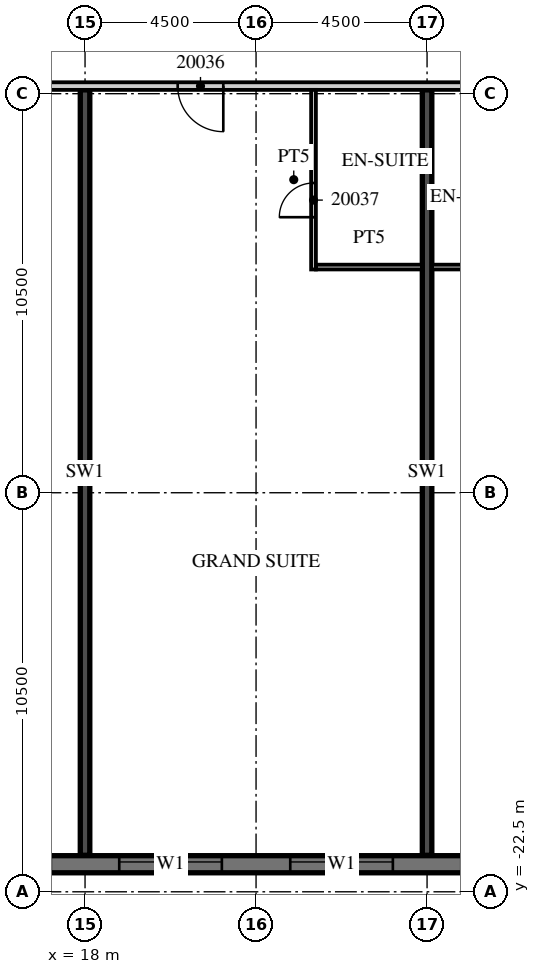
"""IFC4 building model, lengths in metres.
Left out: names, types, materials, properties, quantities, classifications, styles, units other than length and angle.
Written with IfcOpenShell. Run it as: python <this file> out.ifc"""

import sys

from ifc_helpers import new_model, si_unit, direction, frame, frame_2d, origin, place, context, subcontext, project, spatial, rectangle, extrude, element, fill, save


model = new_model("IFC4")
c1 = context("Model", 3, precision=1e-05, world=origin(), true_north=direction((0.0, 1.0)))
c2 = subcontext(c1, "Body", "Model", "MODEL_VIEW")
j1 = project(units=[si_unit("LENGTHUNIT", "METRE"), si_unit("PLANEANGLEUNIT", "RADIAN")], contexts=[c1])
p1 = place(None, origin())
s1 = spatial("IfcSite", under=j1, at=p1, CompositionType="ELEMENT")
p2 = place(p1, origin())
s2 = spatial("IfcBuilding", under=s1, at=p2, CompositionType="ELEMENT")
p3 = place(p2, frame((0.0, 0.0, 96.3)))
s3 = spatial("IfcBuildingStorey", under=s2, at=p3, CompositionType="ELEMENT", Elevation=96.3)
for number, where, z_axis, x_axis in (
    (1, (18.0, -21.54, 0.0), (0.0, 0.0, 1.0), (0.0, 1.0, 0.0)),
    (2, (27.0, -21.54, 0.0), (0.0, 0.0, 1.0), (0.0, 1.0, 0.0)),
):
    element("IfcWall", number, at=place(p3, frame(where, z_axis=z_axis, x_axis=x_axis)), inside=s3, PredefinedType="SHEAR", context=c2, shape_type="SweptSolid", body=[
        extrude(rectangle(XDim=20.14, YDim=0.25, at=frame_2d((10.07, 0.0))), origin(), (0.0, 0.0, 1.0), 3.0),
    ])
p4 = place(p3, frame((-13.5, -21.775, 0.0), z_axis=(0.0, 0.0, 1.0), x_axis=(1.0, 0.0, 0.0)))
e3 = element("IfcWall", 3, at=p4, inside=s3, PredefinedType="SOLIDWALL", context=c2, shape_type="SweptSolid", body=[
    extrude(rectangle(XDim=54.5, YDim=0.45, at=frame_2d((27.25, 0.0))), origin(), (0.0, 0.0, 1.0), 3.0),
])
p5 = place(p4, frame((0.9, 0.0, 0.45)))
e4 = element("IfcOpeningElement", 4, at=p5, cuts=e3, PredefinedType="OPENING", context=c2, shape_type="SweptSolid", body=[
    extrude(rectangle(XDim=2.7, YDim=2.25, at=frame_2d((1.35, 1.125))), frame((0.0, 0.235, 0.0), z_axis=(0.0, -1.0, 0.0), x_axis=(1.0, 0.0, 0.0)), (0.0, 0.0, 1.0), 0.47),
])
p6 = place(p4, frame((5.4, 0.0, 0.45)))
e5 = element("IfcOpeningElement", 5, at=p6, cuts=e3, PredefinedType="OPENING", context=c2, shape_type="SweptSolid", body=[
    extrude(rectangle(XDim=2.7, YDim=2.25, at=frame_2d((1.35, 1.125))), frame((0.0, 0.235, 0.0), z_axis=(0.0, -1.0, 0.0), x_axis=(1.0, 0.0, 0.0)), (0.0, 0.0, 1.0), 0.47),
])
p7 = place(p4, frame((9.9, 0.0, 0.45)))
e6 = element("IfcOpeningElement", 6, at=p7, cuts=e3, PredefinedType="OPENING", context=c2, shape_type="SweptSolid", body=[
    extrude(rectangle(XDim=2.7, YDim=2.25, at=frame_2d((1.35, 1.125))), frame((0.0, 0.235, 0.0), z_axis=(0.0, -1.0, 0.0), x_axis=(1.0, 0.0, 0.0)), (0.0, 0.0, 1.0), 0.47),
])
p8 = place(p4, frame((14.4, 0.0, 0.45)))
e7 = element("IfcOpeningElement", 7, at=p8, cuts=e3, PredefinedType="OPENING", context=c2, shape_type="SweptSolid", body=[
    extrude(rectangle(XDim=2.7, YDim=2.25, at=frame_2d((1.35, 1.125))), frame((0.0, 0.235, 0.0), z_axis=(0.0, -1.0, 0.0), x_axis=(1.0, 0.0, 0.0)), (0.0, 0.0, 1.0), 0.47),
])
p9 = place(p4, frame((18.9, 0.0, 0.45)))
e8 = element("IfcOpeningElement", 8, at=p9, cuts=e3, PredefinedType="OPENING", context=c2, shape_type="SweptSolid", body=[
    extrude(rectangle(XDim=2.7, YDim=2.25, at=frame_2d((1.35, 1.125))), frame((0.0, 0.235, 0.0), z_axis=(0.0, -1.0, 0.0), x_axis=(1.0, 0.0, 0.0)), (0.0, 0.0, 1.0), 0.47),
])
p10 = place(p4, frame((23.4, 0.0, 0.45)))
e9 = element("IfcOpeningElement", 9, at=p10, cuts=e3, PredefinedType="OPENING", context=c2, shape_type="SweptSolid", body=[
    extrude(rectangle(XDim=2.7, YDim=2.25, at=frame_2d((1.35, 1.125))), frame((0.0, 0.235, 0.0), z_axis=(0.0, -1.0, 0.0), x_axis=(1.0, 0.0, 0.0)), (0.0, 0.0, 1.0), 0.47),
])
p11 = place(p4, frame((27.9, 0.0, 0.45)))
e10 = element("IfcOpeningElement", 10, at=p11, cuts=e3, PredefinedType="OPENING", context=c2, shape_type="SweptSolid", body=[
    extrude(rectangle(XDim=2.7, YDim=2.25, at=frame_2d((1.35, 1.125))), frame((0.0, 0.235, 0.0), z_axis=(0.0, -1.0, 0.0), x_axis=(1.0, 0.0, 0.0)), (0.0, 0.0, 1.0), 0.47),
])
p12 = place(p4, frame((32.4, 0.0, 0.45)))
e11 = element("IfcOpeningElement", 11, at=p12, cuts=e3, PredefinedType="OPENING", context=c2, shape_type="SweptSolid", body=[
    extrude(rectangle(XDim=2.7, YDim=2.25, at=frame_2d((1.35, 1.125))), frame((0.0, 0.235, 0.0), z_axis=(0.0, -1.0, 0.0), x_axis=(1.0, 0.0, 0.0)), (0.0, 0.0, 1.0), 0.47),
])
p13 = place(p4, frame((36.9, 0.0, 0.45)))
e12 = element("IfcOpeningElement", 12, at=p13, cuts=e3, PredefinedType="OPENING", context=c2, shape_type="SweptSolid", body=[
    extrude(rectangle(XDim=2.7, YDim=2.25, at=frame_2d((1.35, 1.125))), frame((0.0, 0.235, 0.0), z_axis=(0.0, -1.0, 0.0), x_axis=(1.0, 0.0, 0.0)), (0.0, 0.0, 1.0), 0.47),
])
p14 = place(p4, frame((41.4, 0.0, 0.45)))
e13 = element("IfcOpeningElement", 13, at=p14, cuts=e3, PredefinedType="OPENING", context=c2, shape_type="SweptSolid", body=[
    extrude(rectangle(XDim=2.7, YDim=2.25, at=frame_2d((1.35, 1.125))), frame((0.0, 0.235, 0.0), z_axis=(0.0, -1.0, 0.0), x_axis=(1.0, 0.0, 0.0)), (0.0, 0.0, 1.0), 0.47),
])
p15 = place(p4, frame((45.9, 0.0, 0.45)))
e14 = element("IfcOpeningElement", 14, at=p15, cuts=e3, PredefinedType="OPENING", context=c2, shape_type="SweptSolid", body=[
    extrude(rectangle(XDim=2.7, YDim=2.25, at=frame_2d((1.35, 1.125))), frame((0.0, 0.235, 0.0), z_axis=(0.0, -1.0, 0.0), x_axis=(1.0, 0.0, 0.0)), (0.0, 0.0, 1.0), 0.47),
])
p16 = place(p4, frame((50.4, 0.0, 0.45)))
e15 = element("IfcOpeningElement", 15, at=p16, cuts=e3, PredefinedType="OPENING", context=c2, shape_type="SweptSolid", body=[
    extrude(rectangle(XDim=2.7, YDim=2.25, at=frame_2d((1.35, 1.125))), frame((0.0, 0.235, 0.0), z_axis=(0.0, -1.0, 0.0), x_axis=(1.0, 0.0, 0.0)), (0.0, 0.0, 1.0), 0.47),
])
p17 = place(p3, frame((-13.5, -1.3, 0.0), z_axis=(0.0, 0.0, 1.0), x_axis=(1.0, 0.0, 0.0)))
e16 = element("IfcWall", 16, at=p17, inside=s3, PredefinedType="PARTITIONING", context=c2, shape_type="SweptSolid", body=[
    extrude(rectangle(XDim=58.05, YDim=0.2, at=frame_2d((29.025, 0.0))), origin(), (0.0, 0.0, 1.0), 3.0),
])
p18 = place(p17, frame((0.575, 0.0, 0.0)))
e17 = element("IfcOpeningElement", 17, at=p18, cuts=e16, PredefinedType="OPENING", context=c2, shape_type="SweptSolid", body=[
    extrude(rectangle(XDim=1.0, YDim=2.1, at=frame_2d((0.5, 1.05))), frame((0.0, 0.11, 0.0), z_axis=(0.0, -1.0, 0.0), x_axis=(1.0, 0.0, 0.0)), (0.0, 0.0, 1.0), 0.22),
])
p19 = place(p17, frame((7.45, 0.0, 0.0)))
e18 = element("IfcOpeningElement", 18, at=p19, cuts=e16, PredefinedType="OPENING", context=c2, shape_type="SweptSolid", body=[
    extrude(rectangle(XDim=1.0, YDim=2.1, at=frame_2d((0.5, 1.05))), frame((0.0, 0.11, 0.0), z_axis=(0.0, -1.0, 0.0), x_axis=(1.0, 0.0, 0.0)), (0.0, 0.0, 1.0), 0.22),
])
p20 = place(p17, frame((11.925, 0.0, 0.0)))
e19 = element("IfcOpeningElement", 19, at=p20, cuts=e16, PredefinedType="OPENING", context=c2, shape_type="SweptSolid", body=[
    extrude(rectangle(XDim=1.0, YDim=2.1, at=frame_2d((0.5, 1.05))), frame((0.0, 0.11, 0.0), z_axis=(0.0, -1.0, 0.0), x_axis=(1.0, 0.0, 0.0)), (0.0, 0.0, 1.0), 0.22),
])
p21 = place(p17, frame((14.075, 0.0, 0.0)))
e20 = element("IfcOpeningElement", 20, at=p21, cuts=e16, PredefinedType="OPENING", context=c2, shape_type="SweptSolid", body=[
    extrude(rectangle(XDim=1.0, YDim=2.1, at=frame_2d((0.5, 1.05))), frame((0.0, 0.11, 0.0), z_axis=(0.0, -1.0, 0.0), x_axis=(1.0, 0.0, 0.0)), (0.0, 0.0, 1.0), 0.22),
])
p22 = place(p17, frame((20.925, 0.0, 0.0)))
e21 = element("IfcOpeningElement", 21, at=p22, cuts=e16, PredefinedType="OPENING", context=c2, shape_type="SweptSolid", body=[
    extrude(rectangle(XDim=1.0, YDim=2.1, at=frame_2d((0.5, 1.05))), frame((0.0, 0.11, 0.0), z_axis=(0.0, -1.0, 0.0), x_axis=(1.0, 0.0, 0.0)), (0.0, 0.0, 1.0), 0.22),
])
p23 = place(p17, frame((27.862, 0.0, 0.0)))
e22 = element("IfcOpeningElement", 22, at=p23, cuts=e16, PredefinedType="OPENING", context=c2, shape_type="SweptSolid", body=[
    extrude(rectangle(XDim=1.2, YDim=2.1, at=frame_2d((0.6, 1.05))), frame((0.0, 0.11, 0.0), z_axis=(0.0, -1.0, 0.0), x_axis=(1.0, 0.0, 0.0)), (0.0, 0.0, 1.0), 0.22),
])
p24 = place(p17, frame((33.938, 0.0, 0.0)))
e23 = element("IfcOpeningElement", 23, at=p24, cuts=e16, PredefinedType="OPENING", context=c2, shape_type="SweptSolid", body=[
    extrude(rectangle(XDim=1.2, YDim=2.1, at=frame_2d((0.6, 1.05))), frame((0.0, 0.11, 0.0), z_axis=(0.0, -1.0, 0.0), x_axis=(1.0, 0.0, 0.0)), (0.0, 0.0, 1.0), 0.22),
])
p25 = place(p17, frame((45.862, 0.0, 0.0)))
e24 = element("IfcOpeningElement", 24, at=p25, cuts=e16, PredefinedType="OPENING", context=c2, shape_type="SweptSolid", body=[
    extrude(rectangle(XDim=1.2, YDim=2.1, at=frame_2d((0.6, 1.05))), frame((0.0, 0.11, 0.0), z_axis=(0.0, -1.0, 0.0), x_axis=(1.0, 0.0, 0.0)), (0.0, 0.0, 1.0), 0.22),
])
p26 = place(p17, frame((52.425, 0.0, 0.0)))
e25 = element("IfcOpeningElement", 25, at=p26, cuts=e16, PredefinedType="OPENING", context=c2, shape_type="SweptSolid", body=[
    extrude(rectangle(XDim=1.0, YDim=2.1, at=frame_2d((0.5, 1.05))), frame((0.0, 0.11, 0.0), z_axis=(0.0, -1.0, 0.0), x_axis=(1.0, 0.0, 0.0)), (0.0, 0.0, 1.0), 0.22),
])
p27 = place(p17, frame((56.525, 0.0, 0.0)))
e26 = element("IfcOpeningElement", 26, at=p27, cuts=e16, PredefinedType="OPENING", context=c2, shape_type="SweptSolid", body=[
    extrude(rectangle(XDim=1.0, YDim=2.1, at=frame_2d((0.5, 1.05))), frame((0.0, 0.11, 0.0), z_axis=(0.0, -1.0, 0.0), x_axis=(1.0, 0.0, 0.0)), (0.0, 0.0, 1.0), 0.22),
])
p28 = place(p3, frame((24.012, -6.125, 0.0), z_axis=(0.0, 0.0, 1.0), x_axis=(0.0, 1.0, 0.0)))
e27 = element("IfcWall", 27, at=p28, inside=s3, PredefinedType="PARTITIONING", context=c2, shape_type="SweptSolid", body=[
    extrude(rectangle(XDim=4.725, YDim=0.125, at=frame_2d((2.363, 0.0))), origin(), (0.0, 0.0, 1.0), 3.0),
])
p29 = place(p28, frame((1.375, 0.0, 0.0)))
e28 = element("IfcOpeningElement", 28, at=p29, cuts=e27, PredefinedType="OPENING", context=c2, shape_type="SweptSolid", body=[
    extrude(rectangle(XDim=0.9, YDim=2.1, at=frame_2d((0.45, 1.05))), frame((0.0, 0.073, 0.0), z_axis=(0.0, -1.0, 0.0), x_axis=(1.0, 0.0, 0.0)), (0.0, 0.0, 1.0), 0.145),
])
for number, where, z_axis, x_axis in (
    (29, (24.075, -6.062, 0.0), (0.0, 0.0, 1.0), (1.0, 0.0, 0.0)),
    (30, (27.125, -6.062, 0.0), (0.0, 0.0, 1.0), (1.0, 0.0, 0.0)),
):
    element("IfcWall", number, at=place(p3, frame(where, z_axis=z_axis, x_axis=x_axis)), inside=s3, PredefinedType="PARTITIONING", context=c2, shape_type="SweptSolid", body=[
        extrude(rectangle(XDim=2.8, YDim=0.125, at=frame_2d((1.4, 0.0))), origin(), (0.0, 0.0, 1.0), 3.0),
    ])
p30 = place(p12, origin())
e31 = element("IfcWindow", 31, at=p30, inside=s3, PartitioningType="SINGLE_PANEL", PredefinedType="WINDOW", context=c2, shape_type="SweptSolid", body=[
    extrude(rectangle(XDim=2.7, YDim=2.25, at=frame_2d((1.35, 1.125))), frame((0.0, 0.09, 0.0), z_axis=(0.0, -1.0, 0.0), x_axis=(1.0, 0.0, 0.0)), (0.0, 0.0, 1.0), 0.06),
])
fill(e11, e31)
p31 = place(p13, origin())
e32 = element("IfcWindow", 32, at=p31, inside=s3, PartitioningType="SINGLE_PANEL", PredefinedType="WINDOW", context=c2, shape_type="SweptSolid", body=[
    extrude(rectangle(XDim=2.7, YDim=2.25, at=frame_2d((1.35, 1.125))), frame((0.0, 0.09, 0.0), z_axis=(0.0, -1.0, 0.0), x_axis=(1.0, 0.0, 0.0)), (0.0, 0.0, 1.0), 0.06),
])
fill(e12, e32)
p32 = place(p24, origin())
e33 = element("IfcDoor", 33, at=p32, inside=s3, OperationType="SINGLE_SWING_RIGHT", PredefinedType="DOOR", context=c2, shape_type="SweptSolid", body=[
    extrude(rectangle(XDim=1.2, YDim=2.1, at=frame_2d((0.6, 1.05))), frame((0.0, 0.025, 0.0), z_axis=(0.0, -1.0, 0.0), x_axis=(1.0, 0.0, 0.0)), (0.0, 0.0, 1.0), 0.05),
])
fill(e23, e33)
p33 = place(p29, origin())
e34 = element("IfcDoor", 34, at=p33, inside=s3, OperationType="SINGLE_SWING_LEFT", PredefinedType="DOOR", context=c2, shape_type="SweptSolid", body=[
    extrude(rectangle(XDim=0.9, YDim=2.1, at=frame_2d((0.45, 1.05))), frame((0.0, 0.025, 0.0), z_axis=(0.0, -1.0, 0.0), x_axis=(1.0, 0.0, 0.0)), (0.0, 0.0, 1.0), 0.05),
])
fill(e28, e34)
save(model, sys.argv[1])
